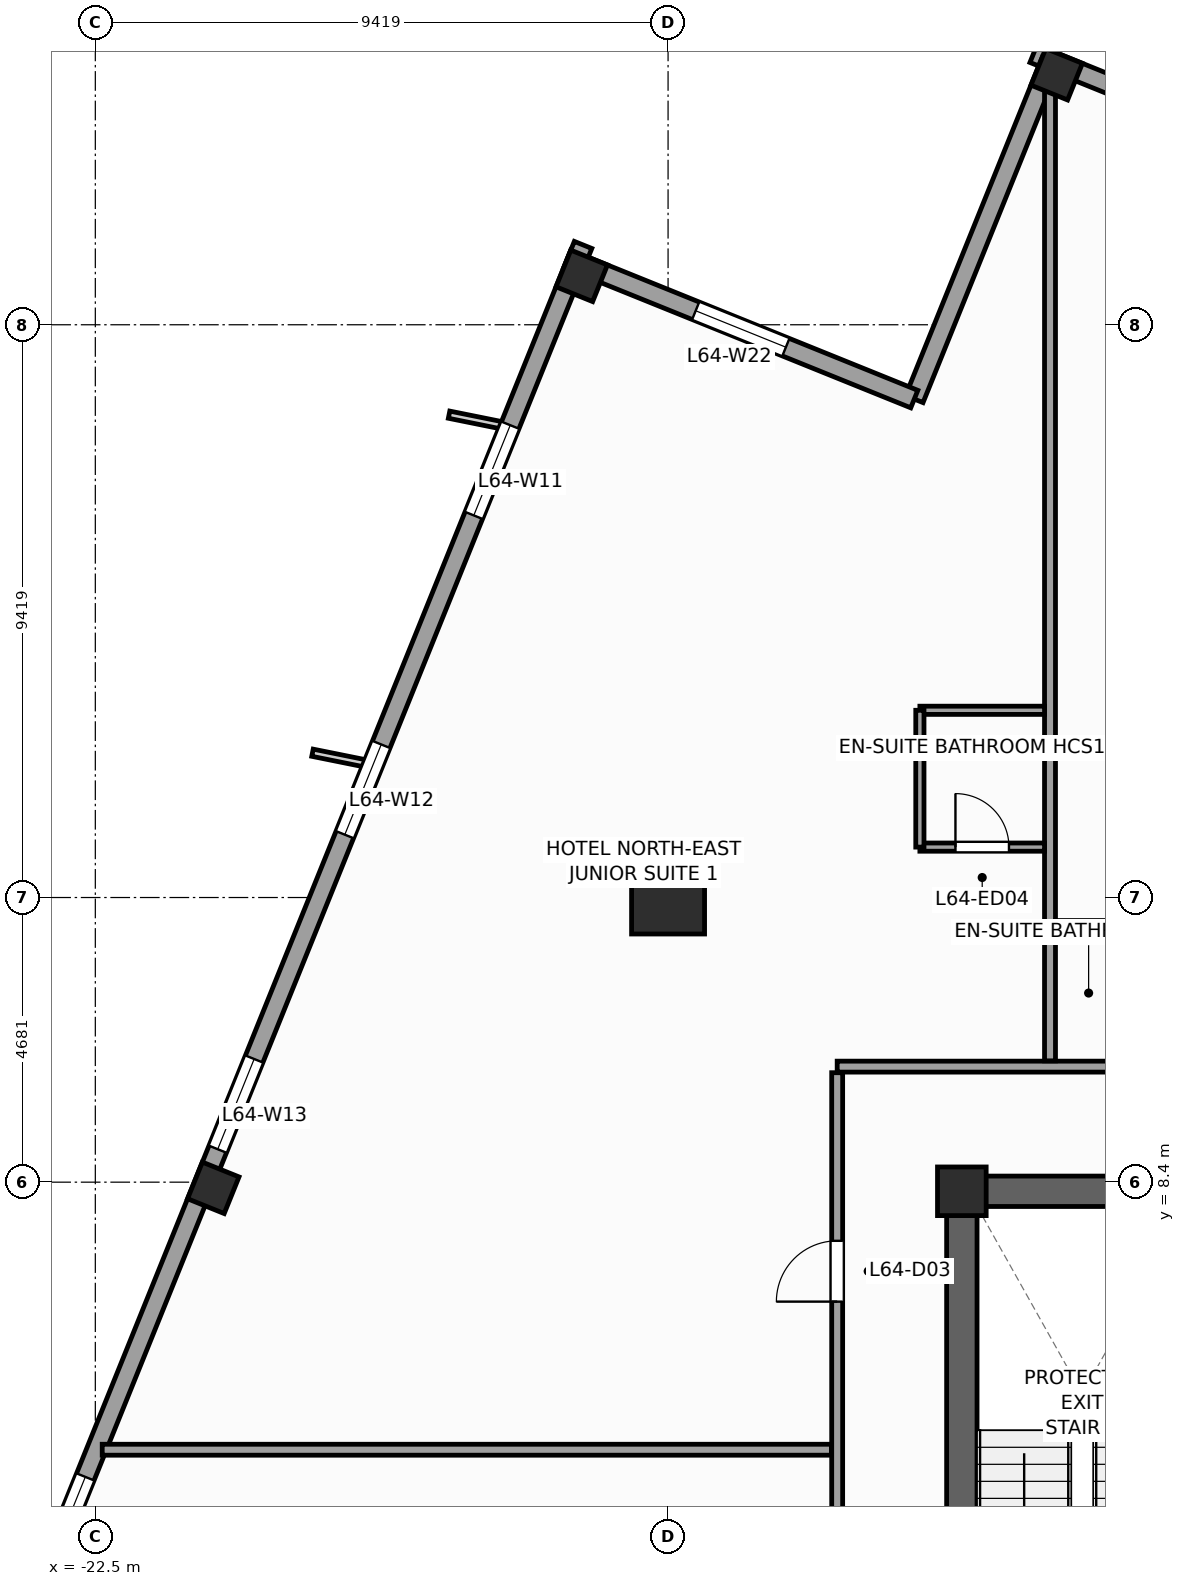
"""IFC4 building model, lengths in metres.
Left out: names, types, materials, properties, quantities, classifications, styles, units other than length and angle.
Written with IfcOpenShell. Run it as: python <this file> out.ifc"""

import sys

from ifc_helpers import new_model, si_unit, direction, frame, frame_2d, origin, origin_2d, place, context, subcontext, project, spatial, rectangle, extrude, source, transform, mapped, element, fill, save


model = new_model("IFC4")
c1 = context("Model", 3, precision=1e-05, world=origin(), true_north=direction((0.0, 1.0)))
c2 = subcontext(c1, "Body", "Model", "MODEL_VIEW")
j1 = project(units=[si_unit("LENGTHUNIT", "METRE"), si_unit("PLANEANGLEUNIT", "RADIAN")], contexts=[c1])
p1 = place(None, origin())
s1 = spatial("IfcSite", under=j1, at=p1, CompositionType="ELEMENT")
p2 = place(p1, origin())
s2 = spatial("IfcBuilding", under=s1, at=p2, CompositionType="ELEMENT")
p3 = place(p2, frame((0.0, 0.0, 265.2)))
s3 = spatial("IfcBuildingStorey", under=s2, at=p3, CompositionType="ELEMENT", Elevation=265.2)
p4 = place(p3, frame((-8.5, 8.25, 0.0), z_axis=(0.0, 0.0, 1.0), x_axis=(1.0, 0.0, 0.0)))
e1 = element("IfcWall", 1, at=p4, inside=s3, PredefinedType="SHEAR", context=c2, shape_type="SweptSolid", body=[
    extrude(rectangle(XDim=17.0, YDim=0.5, at=frame_2d((8.5, 0.0))), origin(), (0.0, 0.0, 1.0), 3.6),
])
p5 = place(p3, frame((-8.25, -8.0, 0.0), z_axis=(0.0, 0.0, 1.0), x_axis=(0.0, 1.0, 0.0)))
e2 = element("IfcWall", 2, at=p5, inside=s3, PredefinedType="SHEAR", context=c2, shape_type="SweptSolid", body=[
    extrude(rectangle(XDim=16.0, YDim=0.5, at=frame_2d((8.0, 0.0))), origin(), (0.0, 0.0, 1.0), 3.6),
])
p6 = place(p5, frame((4.69, 0.0, 0.0)))
e3 = element("IfcOpeningElement", 3, at=p6, cuts=e2, PredefinedType="OPENING", context=c2, shape_type="SweptSolid", body=[
    extrude(rectangle(XDim=1.3, YDim=2.2, at=frame_2d((0.65, 1.1))), frame((0.0, 0.26, 0.0), z_axis=(0.0, -1.0, 0.0), x_axis=(1.0, 0.0, 0.0)), (0.0, 0.0, 1.0), 0.52),
])
m1 = source(origin(), c2, "Body", "SweptSolid", [
    extrude(rectangle(XDim=0.8, YDim=0.8, at=origin_2d()), origin(), (0.0, 0.0, 1.0), 3.6),
])
p7 = place(p3, frame((-8.25, 8.25, 0.0), z_axis=(0.0, 0.0, 1.0), x_axis=(1.0, 0.0, 0.0)))
e4 = element("IfcColumn", 4, at=p7, inside=s3, PredefinedType="PILASTER", context=c2, shape_type="MappedRepresentation", body=[
    mapped(m1, transform((0.0, 0.0, 0.0), scale=1.0)),
])
m2 = source(origin(), c2, "Body", "SweptSolid", [
    extrude(rectangle(XDim=1.2, YDim=1.2, at=origin_2d()), origin(), (0.0, 0.0, 1.0), 3.6),
])
p8 = place(p3, frame((-13.081, 13.081, 0.0), z_axis=(0.0, 0.0, 1.0), x_axis=(1.0, 0.0, 0.0)))
e5 = element("IfcColumn", 5, at=p8, inside=s3, PredefinedType="COLUMN", context=c2, shape_type="MappedRepresentation", body=[
    mapped(m2, transform((0.0, 0.0, 0.0), scale=1.0)),
])
m3 = source(origin(), c2, "Body", "SweptSolid", [
    extrude(rectangle(XDim=0.65, YDim=0.65, at=origin_2d()), origin(), (0.0, 0.0, 1.0), 3.6),
])
for number, where, z_axis, x_axis in (
    (6, (-6.69, 26.62, 0.0), (0.0, 0.0, 1.0), (0.375, 0.927, 0.0)),
    (7, (-14.501, 23.304, 0.0), (0.0, 0.0, 1.0), (0.375, 0.927, 0.0)),
    (8, (-20.56, 8.307, 0.0), (0.0, 0.0, 1.0), (0.375, 0.927, 0.0)),
):
    element("IfcColumn", number, at=place(p3, frame(where, z_axis=z_axis, x_axis=x_axis)), inside=s3, PredefinedType="COLUMN", context=c2, shape_type="MappedRepresentation", body=[
        mapped(m3, transform((0.0, 0.0, 0.0), scale=1.0)),
    ])
p9 = place(p3, frame((23.813, 14.479, 0.0), z_axis=(0.0, 0.0, 1.0), x_axis=(-0.927182657188, 0.374609557019, 0.0)))
e9 = element("IfcWall", 9, at=p9, inside=s3, PredefinedType="STANDARD", context=c2, shape_type="SweptSolid", body=[
    extrude(rectangle(XDim=33.31, YDim=0.31, at=frame_2d((16.655, 0.0))), origin(), (0.0, 0.0, 1.0), 2.75),
])
p10 = place(p9, frame((21.73, 0.0, 0.0)))
e10 = element("IfcOpeningElement", 10, at=p10, cuts=e9, PredefinedType="OPENING", context=c2, shape_type="SweptSolid", body=[
    extrude(rectangle(XDim=1.05, YDim=2.25, at=frame_2d((0.525, 1.125))), frame((0.0, 0.165, 0.0), z_axis=(0.0, -1.0, 0.0), x_axis=(1.0, 0.0, 0.0)), (0.0, 0.0, 1.0), 0.33),
])
p11 = place(p9, frame((3.197, 0.0, 0.47)))
e11 = element("IfcOpeningElement", 11, at=p11, cuts=e9, PredefinedType="OPENING", context=c2, shape_type="SweptSolid", body=[
    extrude(rectangle(XDim=1.6, YDim=2.1, at=frame_2d((0.8, 1.05))), frame((0.0, 0.165, 0.0), z_axis=(0.0, -1.0, 0.0), x_axis=(1.0, 0.0, 0.0)), (0.0, 0.0, 1.0), 0.33),
])
p12 = place(p9, frame((8.86, 0.0, 0.47)))
e12 = element("IfcOpeningElement", 12, at=p12, cuts=e9, PredefinedType="OPENING", context=c2, shape_type="SweptSolid", body=[
    extrude(rectangle(XDim=1.6, YDim=2.1, at=frame_2d((0.8, 1.05))), frame((0.0, 0.165, 0.0), z_axis=(0.0, -1.0, 0.0), x_axis=(1.0, 0.0, 0.0)), (0.0, 0.0, 1.0), 0.33),
])
p13 = place(p9, frame((13.689, 0.0, 0.47)))
e13 = element("IfcOpeningElement", 13, at=p13, cuts=e9, PredefinedType="OPENING", context=c2, shape_type="SweptSolid", body=[
    extrude(rectangle(XDim=1.6, YDim=2.1, at=frame_2d((0.8, 1.05))), frame((0.0, 0.165, 0.0), z_axis=(0.0, -1.0, 0.0), x_axis=(1.0, 0.0, 0.0)), (0.0, 0.0, 1.0), 0.33),
])
p14 = place(p9, frame((24.101, 0.0, 0.47)))
e14 = element("IfcOpeningElement", 14, at=p14, cuts=e9, PredefinedType="OPENING", context=c2, shape_type="SweptSolid", body=[
    extrude(rectangle(XDim=1.6, YDim=2.1, at=frame_2d((0.8, 1.05))), frame((0.0, 0.165, 0.0), z_axis=(0.0, -1.0, 0.0), x_axis=(1.0, 0.0, 0.0)), (0.0, 0.0, 1.0), 0.33),
])
p15 = place(p9, frame((27.847, 0.0, 0.47)))
e15 = element("IfcOpeningElement", 15, at=p15, cuts=e9, PredefinedType="OPENING", context=c2, shape_type="SweptSolid", body=[
    extrude(rectangle(XDim=1.6, YDim=2.1, at=frame_2d((0.8, 1.05))), frame((0.0, 0.165, 0.0), z_axis=(0.0, -1.0, 0.0), x_axis=(1.0, 0.0, 0.0)), (0.0, 0.0, 1.0), 0.33),
])
p16 = place(p3, frame((-6.784, 26.841, 0.0), z_axis=(0.0, 0.0, 1.0), x_axis=(-0.374636620962, -0.927171722085, 0.0)))
e16 = element("IfcWall", 16, at=p16, inside=s3, PredefinedType="STANDARD", context=c2, shape_type="SweptSolid", body=[
    extrude(rectangle(XDim=6.0, YDim=0.31, at=frame_2d((3.0, 0.0))), origin(), (0.0, 0.0, 1.0), 2.65),
])
p17 = place(p3, frame((-9.032, 21.278, 0.0), z_axis=(0.0, 0.0, 1.0), x_axis=(-0.927185411764, 0.374602739196, 0.0)))
e17 = element("IfcWall", 17, at=p17, inside=s3, PredefinedType="STANDARD", context=c2, shape_type="SweptSolid", body=[
    extrude(rectangle(XDim=6.155, YDim=0.31, at=frame_2d((3.078, 0.0))), origin(), (0.0, 0.0, 1.0), 3.35),
])
p18 = place(p17, frame((2.278, 0.0, 0.47)))
e18 = element("IfcOpeningElement", 18, at=p18, cuts=e17, PredefinedType="OPENING", context=c2, shape_type="SweptSolid", body=[
    extrude(rectangle(XDim=1.6, YDim=2.1, at=frame_2d((0.8, 1.05))), frame((0.0, 0.165, 0.0), z_axis=(0.0, -1.0, 0.0), x_axis=(1.0, 0.0, 0.0)), (0.0, 0.0, 1.0), 0.33),
])
p19 = place(p3, frame((-14.479, 23.813, 0.0), z_axis=(0.0, 0.0, 1.0), x_axis=(-0.374609557019, -0.927182657188, 0.0)))
e19 = element("IfcWall", 19, at=p19, inside=s3, PredefinedType="STANDARD", context=c2, shape_type="SweptSolid", body=[
    extrude(rectangle(XDim=33.31, YDim=0.31, at=frame_2d((16.655, 0.0))), origin(), (0.0, 0.0, 1.0), 2.75),
])
p20 = place(p19, frame((3.197, 0.0, 0.47)))
e20 = element("IfcOpeningElement", 20, at=p20, cuts=e19, PredefinedType="OPENING", context=c2, shape_type="SweptSolid", body=[
    extrude(rectangle(XDim=1.6, YDim=2.1, at=frame_2d((0.8, 1.05))), frame((0.0, 0.165, 0.0), z_axis=(0.0, -1.0, 0.0), x_axis=(1.0, 0.0, 0.0)), (0.0, 0.0, 1.0), 0.33),
])
p21 = place(p19, frame((8.86, 0.0, 0.47)))
e21 = element("IfcOpeningElement", 21, at=p21, cuts=e19, PredefinedType="OPENING", context=c2, shape_type="SweptSolid", body=[
    extrude(rectangle(XDim=1.6, YDim=2.1, at=frame_2d((0.8, 1.05))), frame((0.0, 0.165, 0.0), z_axis=(0.0, -1.0, 0.0), x_axis=(1.0, 0.0, 0.0)), (0.0, 0.0, 1.0), 0.33),
])
p22 = place(p19, frame((14.439, 0.0, 0.47)))
e22 = element("IfcOpeningElement", 22, at=p22, cuts=e19, PredefinedType="OPENING", context=c2, shape_type="SweptSolid", body=[
    extrude(rectangle(XDim=1.6, YDim=2.1, at=frame_2d((0.8, 1.05))), frame((0.0, 0.165, 0.0), z_axis=(0.0, -1.0, 0.0), x_axis=(1.0, 0.0, 0.0)), (0.0, 0.0, 1.0), 0.33),
])
p23 = place(p19, frame((21.851, 0.0, 0.47)))
e23 = element("IfcOpeningElement", 23, at=p23, cuts=e19, PredefinedType="OPENING", context=c2, shape_type="SweptSolid", body=[
    extrude(rectangle(XDim=1.6, YDim=2.1, at=frame_2d((0.8, 1.05))), frame((0.0, 0.165, 0.0), z_axis=(0.0, -1.0, 0.0), x_axis=(1.0, 0.0, 0.0)), (0.0, 0.0, 1.0), 0.33),
])
p24 = place(p19, frame((30.097, 0.0, 0.47)))
e24 = element("IfcOpeningElement", 24, at=p24, cuts=e19, PredefinedType="OPENING", context=c2, shape_type="SweptSolid", body=[
    extrude(rectangle(XDim=1.6, YDim=2.1, at=frame_2d((0.8, 1.05))), frame((0.0, 0.165, 0.0), z_axis=(0.0, -1.0, 0.0), x_axis=(1.0, 0.0, 0.0)), (0.0, 0.0, 1.0), 0.33),
])
p25 = place(p19, frame((27.374, 0.0, 0.47)))
e25 = element("IfcOpeningElement", 25, at=p25, cuts=e19, PredefinedType="OPENING", context=c2, shape_type="SweptSolid", body=[
    extrude(rectangle(XDim=1.6, YDim=2.1, at=frame_2d((0.8, 1.05))), frame((0.0, 0.165, 0.0), z_axis=(0.0, -1.0, 0.0), x_axis=(1.0, 0.0, 0.0)), (0.0, 0.0, 1.0), 0.33),
])
p26 = place(p3, frame((-10.3, 10.3, 0.0), z_axis=(0.0, 0.0, 1.0), x_axis=(1.0, 0.0, 0.0)))
e26 = element("IfcWall", 26, at=p26, inside=s3, PredefinedType="PARTITIONING", context=c2, shape_type="SweptSolid", body=[
    extrude(rectangle(XDim=21.7, YDim=0.18, at=frame_2d((10.85, 0.0))), origin(), (0.0, 0.0, 1.0), 3.35),
])
p27 = place(p26, frame((9.8, 0.0, 0.0)))
e27 = element("IfcOpeningElement", 27, at=p27, cuts=e26, PredefinedType="OPENING", context=c2, shape_type="SweptSolid", body=[
    extrude(rectangle(XDim=1.0, YDim=2.15, at=frame_2d((0.5, 1.075))), frame((0.0, 0.1, 0.0), z_axis=(0.0, -1.0, 0.0), x_axis=(1.0, 0.0, 0.0)), (0.0, 0.0, 1.0), 0.2),
])
p28 = place(p3, frame((-10.3, -11.3, 0.0), z_axis=(0.0, 0.0, 1.0), x_axis=(0.0, 1.0, 0.0)))
e28 = element("IfcWall", 28, at=p28, inside=s3, PredefinedType="PARTITIONING", context=c2, shape_type="SweptSolid", body=[
    extrude(rectangle(XDim=21.5, YDim=0.18, at=frame_2d((10.75, 0.0))), origin(), (0.0, 0.0, 1.0), 3.35),
])
p29 = place(p28, frame((12.9, 0.0, 0.0)))
e29 = element("IfcOpeningElement", 29, at=p29, cuts=e28, PredefinedType="OPENING", context=c2, shape_type="SweptSolid", body=[
    extrude(rectangle(XDim=1.0, YDim=2.15, at=frame_2d((0.5, 1.075))), frame((0.0, 0.1, 0.0), z_axis=(0.0, -1.0, 0.0), x_axis=(1.0, 0.0, 0.0)), (0.0, 0.0, 1.0), 0.2),
])
p30 = place(p28, frame((17.736, 0.0, 0.0)))
e30 = element("IfcOpeningElement", 30, at=p30, cuts=e28, PredefinedType="OPENING", context=c2, shape_type="SweptSolid", body=[
    extrude(rectangle(XDim=1.0, YDim=2.15, at=frame_2d((0.5, 1.075))), frame((0.0, 0.1, 0.0), z_axis=(0.0, -1.0, 0.0), x_axis=(1.0, 0.0, 0.0)), (0.0, 0.0, 1.0), 0.2),
])
p31 = place(p28, frame((1.714, 0.0, 0.0)))
e31 = element("IfcOpeningElement", 31, at=p31, cuts=e28, PredefinedType="OPENING", context=c2, shape_type="SweptSolid", body=[
    extrude(rectangle(XDim=1.0, YDim=2.15, at=frame_2d((0.5, 1.075))), frame((0.0, 0.1, 0.0), z_axis=(0.0, -1.0, 0.0), x_axis=(1.0, 0.0, 0.0)), (0.0, 0.0, 1.0), 0.2),
])
p32 = place(p28, frame((5.4, 0.0, 0.0)))
e32 = element("IfcOpeningElement", 32, at=p32, cuts=e28, PredefinedType="OPENING", context=c2, shape_type="SweptSolid", body=[
    extrude(rectangle(XDim=1.0, YDim=2.15, at=frame_2d((0.5, 1.075))), frame((0.0, 0.1, 0.0), z_axis=(0.0, -1.0, 0.0), x_axis=(1.0, 0.0, 0.0)), (0.0, 0.0, 1.0), 0.2),
])
p33 = place(p28, frame((9.1, 0.0, 0.0)))
e33 = element("IfcOpeningElement", 33, at=p33, cuts=e28, PredefinedType="OPENING", context=c2, shape_type="SweptSolid", body=[
    extrude(rectangle(XDim=1.0, YDim=2.15, at=frame_2d((0.5, 1.075))), frame((0.0, 0.1, 0.0), z_axis=(0.0, -1.0, 0.0), x_axis=(1.0, 0.0, 0.0)), (0.0, 0.0, 1.0), 0.2),
])
p34 = place(p3, frame((-6.8, 10.395, 0.0), z_axis=(0.0, 0.0, 1.0), x_axis=(0.0, 1.0, 0.0)))
e34 = element("IfcWall", 34, at=p34, inside=s3, PredefinedType="PARTITIONING", context=c2, shape_type="SweptSolid", body=[
    extrude(rectangle(XDim=16.167, YDim=0.18, at=frame_2d((8.083, 0.0))), origin(), (0.0, 0.0, 1.0), 3.35),
])
p35 = place(p3, frame((-10.395, 4.0, 0.0), z_axis=(0.0, 0.0, 1.0), x_axis=(-1.0, 0.0, 0.0)))
e35 = element("IfcWall", 35, at=p35, inside=s3, PredefinedType="PARTITIONING", context=c2, shape_type="SweptSolid", body=[
    extrude(rectangle(XDim=11.992, YDim=0.18, at=frame_2d((5.996, 0.0))), origin(), (0.0, 0.0, 1.0), 3.02),
])
p36 = place(p3, frame((-8.94, 13.91, 0.0), z_axis=(0.0, 0.0, 1.0), x_axis=(1.0, 0.0, 0.0)))
e36 = element("IfcWall", 36, at=p36, inside=s3, PredefinedType="PARTITIONING", context=c2, shape_type="SweptSolid", body=[
    extrude(rectangle(XDim=2.05, YDim=0.135, at=frame_2d((1.025, 0.0))), origin(), (0.0, 0.0, 1.0), 3.35),
])
p37 = place(p36, frame((0.585, 0.0, 0.0)))
e37 = element("IfcOpeningElement", 37, at=p37, cuts=e36, PredefinedType="OPENING", context=c2, shape_type="SweptSolid", body=[
    extrude(rectangle(XDim=0.88, YDim=2.1, at=frame_2d((0.44, 1.05))), frame((0.0, 0.078, 0.0), z_axis=(0.0, -1.0, 0.0), x_axis=(1.0, 0.0, 0.0)), (0.0, 0.0, 1.0), 0.155),
])
p38 = place(p3, frame((-8.94, 16.16, 0.0), z_axis=(0.0, 0.0, 1.0), x_axis=(1.0, 0.0, 0.0)))
e38 = element("IfcWall", 38, at=p38, inside=s3, PredefinedType="PARTITIONING", context=c2, shape_type="SweptSolid", body=[
    extrude(rectangle(XDim=2.05, YDim=0.135, at=frame_2d((1.025, 0.0))), origin(), (0.0, 0.0, 1.0), 3.35),
])
p39 = place(p3, frame((-8.94, 13.91, 0.0), z_axis=(0.0, 0.0, 1.0), x_axis=(0.0, 1.0, 0.0)))
e39 = element("IfcWall", 39, at=p39, inside=s3, PredefinedType="PARTITIONING", context=c2, shape_type="SweptSolid", body=[
    extrude(rectangle(XDim=2.25, YDim=0.135, at=frame_2d((1.125, 0.0))), origin(), (0.0, 0.0, 1.0), 3.35),
])
p40 = place(p3, frame((-6.71, 12.635, 0.0), z_axis=(0.0, 0.0, 1.0), x_axis=(1.0, 0.0, 0.0)))
e40 = element("IfcWall", 40, at=p40, inside=s3, PredefinedType="PARTITIONING", context=c2, shape_type="SweptSolid", body=[
    extrude(rectangle(XDim=2.05, YDim=0.135, at=frame_2d((1.025, 0.0))), origin(), (0.0, 0.0, 1.0), 3.35),
])
m4 = source(origin(), c2, "Body", "SweptSolid", [
    extrude(rectangle(XDim=1.6, YDim=2.1, at=frame_2d((0.8, 1.05))), frame((0.0, 0.03, 0.0), z_axis=(0.0, -1.0, 0.0), x_axis=(1.0, 0.0, 0.0)), (0.0, 0.0, 1.0), 0.06),
])
p41 = place(p20, origin())
e41 = element("IfcWindow", 41, at=p41, inside=s3, PartitioningType="SINGLE_PANEL", PredefinedType="WINDOW", context=c2, shape_type="MappedRepresentation", body=[
    mapped(m4, transform((0.0, 0.0, 0.0), scale=1.0)),
])
fill(e20, e41)
p42 = place(p21, origin())
e42 = element("IfcWindow", 42, at=p42, inside=s3, PartitioningType="SINGLE_PANEL", PredefinedType="WINDOW", context=c2, shape_type="MappedRepresentation", body=[
    mapped(m4, transform((0.0, 0.0, 0.0), scale=1.0)),
])
fill(e21, e42)
p43 = place(p22, origin())
e43 = element("IfcWindow", 43, at=p43, inside=s3, PartitioningType="SINGLE_PANEL", PredefinedType="WINDOW", context=c2, shape_type="MappedRepresentation", body=[
    mapped(m4, transform((0.0, 0.0, 0.0), scale=1.0)),
])
fill(e22, e43)
p44 = place(p23, origin())
e44 = element("IfcWindow", 44, at=p44, inside=s3, PartitioningType="SINGLE_PANEL", PredefinedType="WINDOW", context=c2, shape_type="MappedRepresentation", body=[
    mapped(m4, transform((0.0, 0.0, 0.0), scale=1.0)),
])
fill(e23, e44)
p45 = place(p18, origin())
e45 = element("IfcWindow", 45, at=p45, inside=s3, PartitioningType="SINGLE_PANEL", PredefinedType="WINDOW", context=c2, shape_type="MappedRepresentation", body=[
    mapped(m4, transform((0.0, 0.0, 0.0), scale=1.0)),
])
fill(e18, e45)
m5 = source(origin(), c2, "Body", "SweptSolid", [
    extrude(rectangle(XDim=1.0, YDim=2.15, at=frame_2d((0.5, 1.075))), frame((0.0, 0.025, 0.0), z_axis=(0.0, -1.0, 0.0), x_axis=(1.0, 0.0, 0.0)), (0.0, 0.0, 1.0), 0.05),
])
p46 = place(p30, origin())
e46 = element("IfcDoor", 46, at=p46, inside=s3, OperationType="SINGLE_SWING_LEFT", PredefinedType="DOOR", context=c2, shape_type="MappedRepresentation", body=[
    mapped(m5, transform((0.0, 0.0, 0.0), scale=1.0)),
])
fill(e30, e46)
m6 = source(origin(), c2, "Body", "SweptSolid", [
    extrude(rectangle(XDim=0.88, YDim=2.1, at=frame_2d((0.44, 1.05))), frame((0.0, 0.025, 0.0), z_axis=(0.0, -1.0, 0.0), x_axis=(1.0, 0.0, 0.0)), (0.0, 0.0, 1.0), 0.05),
])
p47 = place(p37, origin())
e47 = element("IfcDoor", 47, at=p47, inside=s3, OperationType="SINGLE_SWING_LEFT", PredefinedType="DOOR", context=c2, shape_type="MappedRepresentation", body=[
    mapped(m6, transform((0.0, 0.0, 0.0), scale=1.0)),
])
fill(e37, e47)
save(model, sys.argv[1])
